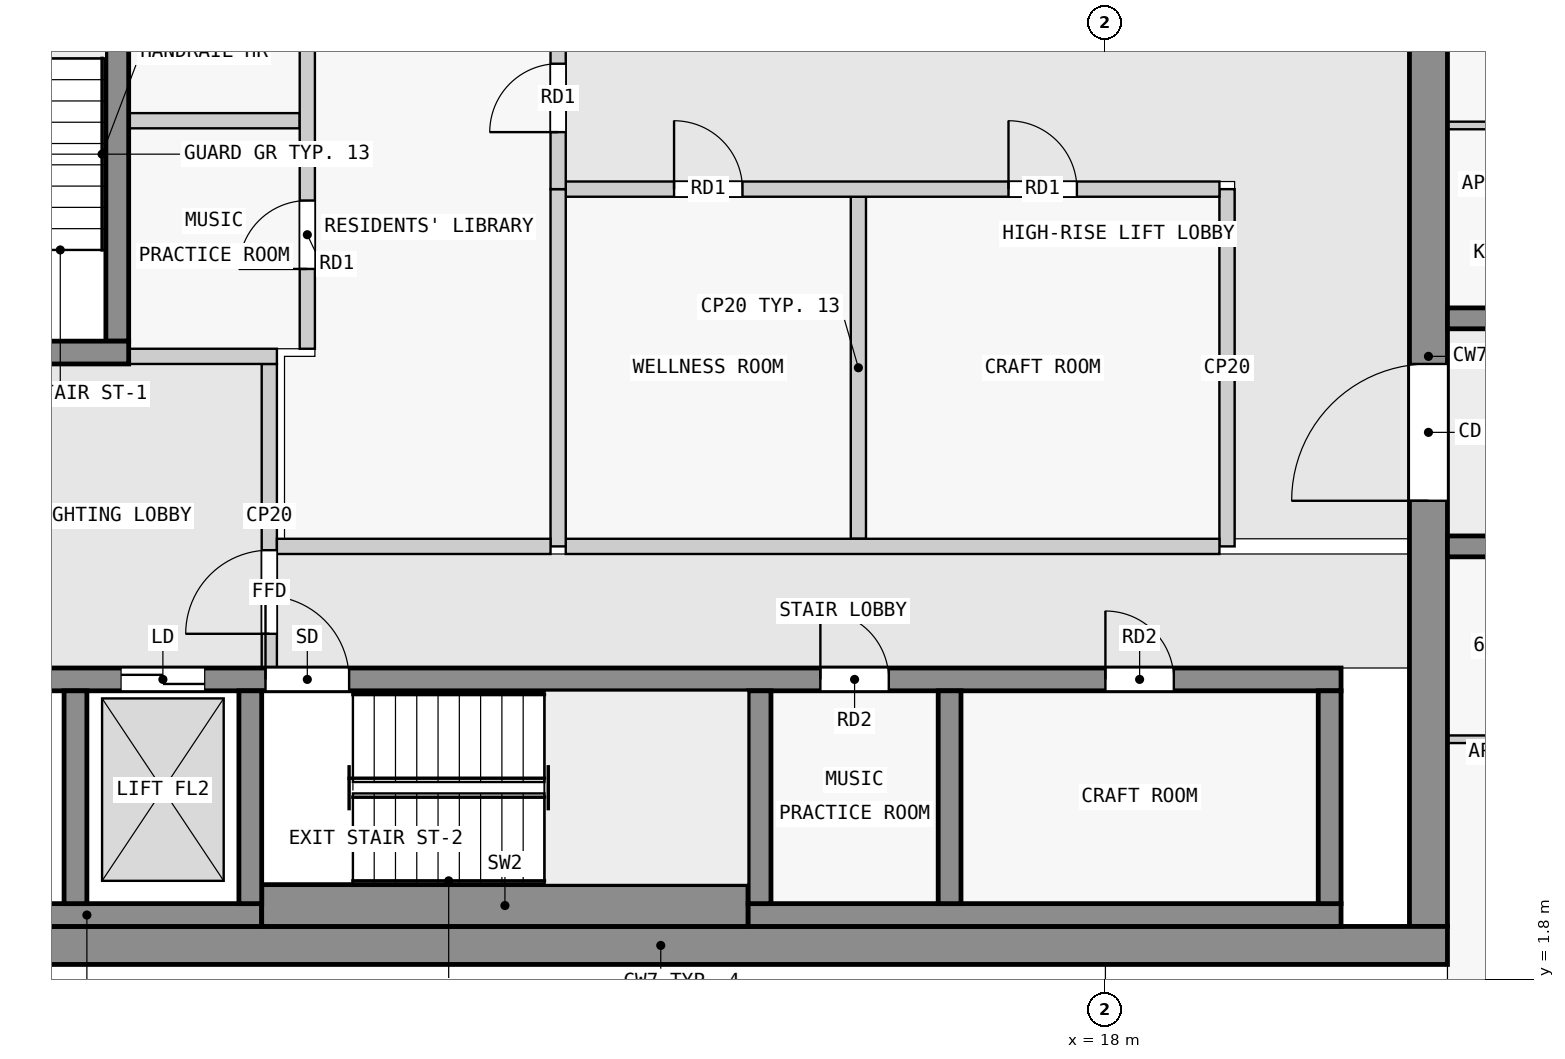
"""IFC4 building model, lengths in metres.
Left out: names, types, materials, properties, quantities, classifications, styles, units other than length and angle.
Written with IfcOpenShell. Run it as: python <this file> out.ifc"""

import sys

from ifc_helpers import new_model, si_unit, direction, frame, frame_2d, origin, place, context, subcontext, project, spatial, rectangle, extrude, element, fill, save


model = new_model("IFC4")
c1 = context("Model", 3, precision=1e-05, world=origin(), true_north=direction((0.0, 1.0)))
c2 = subcontext(c1, "Body", "Model", "MODEL_VIEW")
j1 = project(units=[si_unit("LENGTHUNIT", "METRE"), si_unit("PLANEANGLEUNIT", "RADIAN")], contexts=[c1])
p1 = place(None, origin())
s1 = spatial("IfcSite", under=j1, at=p1, CompositionType="ELEMENT")
p2 = place(p1, origin())
s2 = spatial("IfcBuilding", under=s1, at=p2, CompositionType="ELEMENT")
p3 = place(p2, frame((0.0, 0.0, 229.4)))
s3 = spatial("IfcBuildingStorey", under=s2, at=p3, CompositionType="ELEMENT", Elevation=229.4)
p4 = place(p3, frame((1.8, 2.25, 0.0), z_axis=(0.0, 0.0, 1.0), x_axis=(1.0, 0.0, 0.0)))
e1 = element("IfcWall", 1, at=p4, inside=s3, PredefinedType="SHEAR", context=c2, shape_type="SweptSolid", body=[
    extrude(rectangle(XDim=20.7, YDim=0.5, at=frame_2d((10.35, 0.0))), origin(), (0.0, 0.0, 1.0), 3.25),
])
p5 = place(p3, frame((22.25, 2.5, 0.0), z_axis=(0.0, 0.0, 1.0), x_axis=(0.0, 1.0, 0.0)))
e2 = element("IfcWall", 2, at=p5, inside=s3, PredefinedType="SHEAR", context=c2, shape_type="SweptSolid", body=[
    extrude(rectangle(XDim=15.0, YDim=0.5, at=frame_2d((7.5, 0.0))), origin(), (0.0, 0.0, 1.0), 3.25),
])
p6 = place(p5, frame((5.6, 0.0, 0.0)))
e3 = element("IfcOpeningElement", 3, at=p6, cuts=e2, PredefinedType="OPENING", context=c2, shape_type="SweptSolid", body=[
    extrude(rectangle(XDim=1.8, YDim=2.1, at=frame_2d((0.9, 1.05))), frame((0.0, 0.26, 0.0), z_axis=(0.0, -1.0, 0.0), x_axis=(1.0, 0.0, 0.0)), (0.0, 0.0, 1.0), 0.52),
])
p7 = place(p3, frame((2.3, 2.65, 0.0), z_axis=(0.0, 0.0, 1.0), x_axis=(1.0, 0.0, 0.0)))
e4 = element("IfcWall", 4, at=p7, inside=s3, PredefinedType="SHEAR", context=c2, shape_type="SweptSolid", body=[
    extrude(rectangle(XDim=4.6, YDim=0.3, at=frame_2d((2.3, 0.0))), origin(), (0.0, 0.0, 1.0), 3.25),
])
p8 = place(p3, frame((6.9, 2.775, 0.0), z_axis=(0.0, 0.0, 1.0), x_axis=(1.0, 0.0, 0.0)))
e5 = element("IfcWall", 5, at=p8, inside=s3, PredefinedType="SHEAR", context=c2, shape_type="SweptSolid", body=[
    extrude(rectangle(XDim=6.4, YDim=0.55, at=frame_2d((3.2, 0.0))), origin(), (0.0, 0.0, 1.0), 3.25),
])
p9 = place(p3, frame((13.3, 2.65, 0.0), z_axis=(0.0, 0.0, 1.0), x_axis=(1.0, 0.0, 0.0)))
e6 = element("IfcWall", 6, at=p9, inside=s3, PredefinedType="SHEAR", context=c2, shape_type="SweptSolid", body=[
    extrude(rectangle(XDim=7.8, YDim=0.3, at=frame_2d((3.9, 0.0))), origin(), (0.0, 0.0, 1.0), 3.25),
])
for number, where, z_axis, x_axis in (
    (7, (4.45, 2.8, 0.0), (0.0, 0.0, 1.0), (0.0, 1.0, 0.0)),
    (8, (6.75, 2.8, 0.0), (0.0, 0.0, 1.0), (0.0, 1.0, 0.0)),
    (9, (13.45, 2.8, 0.0), (0.0, 0.0, 1.0), (0.0, 1.0, 0.0)),
    (10, (15.95, 2.8, 0.0), (0.0, 0.0, 1.0), (0.0, 1.0, 0.0)),
    (11, (20.95, 2.8, 0.0), (0.0, 0.0, 1.0), (0.0, 1.0, 0.0)),
):
    element("IfcWall", number, at=place(p3, frame(where, z_axis=z_axis, x_axis=x_axis)), inside=s3, PredefinedType="SHEAR", context=c2, shape_type="SweptSolid", body=[
        extrude(rectangle(XDim=2.8, YDim=0.3, at=frame_2d((1.4, 0.0))), origin(), (0.0, 0.0, 1.0), 3.25),
    ])
p10 = place(p3, frame((2.3, 5.75, 0.0), z_axis=(0.0, 0.0, 1.0), x_axis=(1.0, 0.0, 0.0)))
e12 = element("IfcWall", 12, at=p10, inside=s3, PredefinedType="SHEAR", context=c2, shape_type="SweptSolid", body=[
    extrude(rectangle(XDim=18.8, YDim=0.3, at=frame_2d((9.4, 0.0))), origin(), (0.0, 0.0, 1.0), 3.25),
])
p11 = place(p10, frame((4.65, 0.0, 0.0)))
e13 = element("IfcOpeningElement", 13, at=p11, cuts=e12, PredefinedType="OPENING", context=c2, shape_type="SweptSolid", body=[
    extrude(rectangle(XDim=1.1, YDim=2.1, at=frame_2d((0.55, 1.05))), frame((0.0, 0.16, 0.0), z_axis=(0.0, -1.0, 0.0), x_axis=(1.0, 0.0, 0.0)), (0.0, 0.0, 1.0), 0.32),
])
p12 = place(p10, frame((0.45, 0.0, 0.0)))
e14 = element("IfcOpeningElement", 14, at=p12, cuts=e12, PredefinedType="OPENING", context=c2, shape_type="SweptSolid", body=[
    extrude(rectangle(XDim=1.1, YDim=2.1, at=frame_2d((0.55, 1.05))), frame((0.0, 0.16, 0.0), z_axis=(0.0, -1.0, 0.0), x_axis=(1.0, 0.0, 0.0)), (0.0, 0.0, 1.0), 0.32),
])
p13 = place(p10, frame((2.75, 0.0, 0.0)))
e15 = element("IfcOpeningElement", 15, at=p13, cuts=e12, PredefinedType="OPENING", context=c2, shape_type="SweptSolid", body=[
    extrude(rectangle(XDim=1.1, YDim=2.1, at=frame_2d((0.55, 1.05))), frame((0.0, 0.16, 0.0), z_axis=(0.0, -1.0, 0.0), x_axis=(1.0, 0.0, 0.0)), (0.0, 0.0, 1.0), 0.32),
])
p14 = place(p10, frame((11.95, 0.0, 0.0)))
e16 = element("IfcOpeningElement", 16, at=p14, cuts=e12, PredefinedType="OPENING", context=c2, shape_type="SweptSolid", body=[
    extrude(rectangle(XDim=0.9, YDim=2.1, at=frame_2d((0.45, 1.05))), frame((0.0, 0.16, 0.0), z_axis=(0.0, -1.0, 0.0), x_axis=(1.0, 0.0, 0.0)), (0.0, 0.0, 1.0), 0.32),
])
p15 = place(p10, frame((15.7, 0.0, 0.0)))
e17 = element("IfcOpeningElement", 17, at=p15, cuts=e12, PredefinedType="OPENING", context=c2, shape_type="SweptSolid", body=[
    extrude(rectangle(XDim=0.9, YDim=2.1, at=frame_2d((0.45, 1.05))), frame((0.0, 0.16, 0.0), z_axis=(0.0, -1.0, 0.0), x_axis=(1.0, 0.0, 0.0)), (0.0, 0.0, 1.0), 0.32),
])
p16 = place(p3, frame((2.3, 10.05, 0.0), z_axis=(0.0, 0.0, 1.0), x_axis=(1.0, 0.0, 0.0)))
e18 = element("IfcWall", 18, at=p16, inside=s3, PredefinedType="SHEAR", context=c2, shape_type="SweptSolid", body=[
    extrude(rectangle(XDim=2.85, YDim=0.3, at=frame_2d((1.425, 0.0))), origin(), (0.0, 0.0, 1.0), 3.25),
])
p17 = place(p16, frame((0.25, 0.0, 0.0)))
e19 = element("IfcOpeningElement", 19, at=p17, cuts=e18, PredefinedType="OPENING", context=c2, shape_type="SweptSolid", body=[
    extrude(rectangle(XDim=1.1, YDim=2.1, at=frame_2d((0.55, 1.05))), frame((0.0, 0.16, 0.0), z_axis=(0.0, -1.0, 0.0), x_axis=(1.0, 0.0, 0.0)), (0.0, 0.0, 1.0), 0.32),
])
p18 = place(p3, frame((5.0, 10.2, 0.0), z_axis=(0.0, 0.0, 1.0), x_axis=(0.0, 1.0, 0.0)))
e20 = element("IfcWall", 20, at=p18, inside=s3, PredefinedType="SHEAR", context=c2, shape_type="SweptSolid", body=[
    extrude(rectangle(XDim=6.4, YDim=0.3, at=frame_2d((3.2, 0.0))), origin(), (0.0, 0.0, 1.0), 3.25),
])
p19 = place(p3, frame((22.5, 7.5, 0.0), z_axis=(0.0, 0.0, 1.0), x_axis=(1.0, 0.0, 0.0)))
e21 = element("IfcWall", 21, at=p19, inside=s3, PredefinedType="SHEAR", context=c2, shape_type="SweptSolid", body=[
    extrude(rectangle(XDim=22.5, YDim=0.275, at=frame_2d((11.25, 0.0))), origin(), (0.0, 0.0, 1.0), 3.25),
])
p20 = place(p19, frame((1.75, 0.0, 0.0)))
e22 = element("IfcOpeningElement", 22, at=p20, cuts=e21, PredefinedType="OPENING", context=c2, shape_type="SweptSolid", body=[
    extrude(rectangle(XDim=1.0, YDim=2.1, at=frame_2d((0.5, 1.05))), frame((0.0, 0.147, 0.0), z_axis=(0.0, -1.0, 0.0), x_axis=(1.0, 0.0, 0.0)), (0.0, 0.0, 1.0), 0.295),
])
p21 = place(p19, frame((5.85, 0.0, 0.0)))
e23 = element("IfcOpeningElement", 23, at=p21, cuts=e21, PredefinedType="OPENING", context=c2, shape_type="SweptSolid", body=[
    extrude(rectangle(XDim=1.8, YDim=2.1, at=frame_2d((0.9, 1.05))), frame((0.0, 0.147, 0.0), z_axis=(0.0, -1.0, 0.0), x_axis=(1.0, 0.0, 0.0)), (0.0, 0.0, 1.0), 0.295),
])
p22 = place(p19, frame((10.75, 0.0, 0.0)))
e24 = element("IfcOpeningElement", 24, at=p22, cuts=e21, PredefinedType="OPENING", context=c2, shape_type="SweptSolid", body=[
    extrude(rectangle(XDim=1.0, YDim=2.1, at=frame_2d((0.5, 1.05))), frame((0.0, 0.147, 0.0), z_axis=(0.0, -1.0, 0.0), x_axis=(1.0, 0.0, 0.0)), (0.0, 0.0, 1.0), 0.295),
])
p23 = place(p19, frame((16.85, 0.0, 0.0)))
e25 = element("IfcOpeningElement", 25, at=p23, cuts=e21, PredefinedType="OPENING", context=c2, shape_type="SweptSolid", body=[
    extrude(rectangle(XDim=1.0, YDim=2.1, at=frame_2d((0.5, 1.05))), frame((0.0, 0.147, 0.0), z_axis=(0.0, -1.0, 0.0), x_axis=(1.0, 0.0, 0.0)), (0.0, 0.0, 1.0), 0.295),
])
p24 = place(p3, frame((22.5, 10.5, 0.0), z_axis=(0.0, 0.0, 1.0), x_axis=(1.0, 0.0, 0.0)))
e26 = element("IfcWall", 26, at=p24, inside=s3, PredefinedType="SHEAR", context=c2, shape_type="SweptSolid", body=[
    extrude(rectangle(XDim=22.5, YDim=0.275, at=frame_2d((11.25, 0.0))), origin(), (0.0, 0.0, 1.0), 3.25),
])
p25 = place(p24, frame((4.05, 0.0, 0.0)))
e27 = element("IfcOpeningElement", 27, at=p25, cuts=e26, PredefinedType="OPENING", context=c2, shape_type="SweptSolid", body=[
    extrude(rectangle(XDim=1.0, YDim=2.1, at=frame_2d((0.5, 1.05))), frame((0.0, 0.147, 0.0), z_axis=(0.0, -1.0, 0.0), x_axis=(1.0, 0.0, 0.0)), (0.0, 0.0, 1.0), 0.295),
])
p26 = place(p24, frame((10.75, 0.0, 0.0)))
e28 = element("IfcOpeningElement", 28, at=p26, cuts=e26, PredefinedType="OPENING", context=c2, shape_type="SweptSolid", body=[
    extrude(rectangle(XDim=1.0, YDim=2.1, at=frame_2d((0.5, 1.05))), frame((0.0, 0.147, 0.0), z_axis=(0.0, -1.0, 0.0), x_axis=(1.0, 0.0, 0.0)), (0.0, 0.0, 1.0), 0.295),
])
p27 = place(p24, frame((15.25, 0.0, 0.0)))
e29 = element("IfcOpeningElement", 29, at=p27, cuts=e26, PredefinedType="OPENING", context=c2, shape_type="SweptSolid", body=[
    extrude(rectangle(XDim=1.0, YDim=2.1, at=frame_2d((0.5, 1.05))), frame((0.0, 0.147, 0.0), z_axis=(0.0, -1.0, 0.0), x_axis=(1.0, 0.0, 0.0)), (0.0, 0.0, 1.0), 0.295),
])
p28 = place(p24, frame((18.75, 0.0, 0.0)))
e30 = element("IfcOpeningElement", 30, at=p28, cuts=e26, PredefinedType="OPENING", context=c2, shape_type="SweptSolid", body=[
    extrude(rectangle(XDim=0.9, YDim=2.1, at=frame_2d((0.45, 1.05))), frame((0.0, 0.147, 0.0), z_axis=(0.0, -1.0, 0.0), x_axis=(1.0, 0.0, 0.0)), (0.0, 0.0, 1.0), 0.295),
])
p29 = place(p24, frame((20.95, 0.0, 0.0)))
e31 = element("IfcOpeningElement", 31, at=p29, cuts=e26, PredefinedType="OPENING", context=c2, shape_type="SweptSolid", body=[
    extrude(rectangle(XDim=1.0, YDim=2.1, at=frame_2d((0.5, 1.05))), frame((0.0, 0.147, 0.0), z_axis=(0.0, -1.0, 0.0), x_axis=(1.0, 0.0, 0.0)), (0.0, 0.0, 1.0), 0.295),
])
p30 = place(p3, frame((7.0, 5.9, 0.0), z_axis=(0.0, 0.0, 1.0), x_axis=(0.0, 1.0, 0.0)))
e32 = element("IfcWall", 32, at=p30, inside=s3, PredefinedType="PARTITIONING", context=c2, shape_type="SweptSolid", body=[
    extrude(rectangle(XDim=4.0, YDim=0.2, at=frame_2d((2.0, 0.0))), origin(), (0.0, 0.0, 1.0), 3.25),
])
p31 = place(p30, frame((0.45, 0.0, 0.0)))
e33 = element("IfcOpeningElement", 33, at=p31, cuts=e32, PredefinedType="OPENING", context=c2, shape_type="SweptSolid", body=[
    extrude(rectangle(XDim=1.1, YDim=2.1, at=frame_2d((0.55, 1.05))), frame((0.0, 0.11, 0.0), z_axis=(0.0, -1.0, 0.0), x_axis=(1.0, 0.0, 0.0)), (0.0, 0.0, 1.0), 0.22),
])
p32 = place(p3, frame((5.15, 10.0, 0.0), z_axis=(0.0, 0.0, 1.0), x_axis=(1.0, 0.0, 0.0)))
e34 = element("IfcWall", 34, at=p32, inside=s3, PredefinedType="PARTITIONING", context=c2, shape_type="SweptSolid", body=[
    extrude(rectangle(XDim=1.95, YDim=0.2, at=frame_2d((0.975, 0.0))), origin(), (0.0, 0.0, 1.0), 3.25),
])
p33 = place(p3, frame((7.1, 7.5, 0.0), z_axis=(0.0, 0.0, 1.0), x_axis=(1.0, 0.0, 0.0)))
e35 = element("IfcWall", 35, at=p33, inside=s3, PredefinedType="PARTITIONING", context=c2, shape_type="SweptSolid", body=[
    extrude(rectangle(XDim=3.6, YDim=0.2, at=frame_2d((1.8, 0.0))), origin(), (0.0, 0.0, 1.0), 3.25),
])
p34 = place(p3, frame((10.8, 12.2, 0.0), z_axis=(0.0, 0.0, 1.0), x_axis=(0.0, 1.0, 0.0)))
e36 = element("IfcWall", 36, at=p34, inside=s3, PredefinedType="PARTITIONING", context=c2, shape_type="SweptSolid", body=[
    extrude(rectangle(XDim=2.4, YDim=0.2, at=frame_2d((1.2, 0.0))), origin(), (0.0, 0.0, 1.0), 3.25),
])
p35 = place(p34, frame((0.75, 0.0, 0.0)))
e37 = element("IfcOpeningElement", 37, at=p35, cuts=e36, PredefinedType="OPENING", context=c2, shape_type="SweptSolid", body=[
    extrude(rectangle(XDim=0.9, YDim=2.1, at=frame_2d((0.45, 1.05))), frame((0.0, 0.11, 0.0), z_axis=(0.0, -1.0, 0.0), x_axis=(1.0, 0.0, 0.0)), (0.0, 0.0, 1.0), 0.22),
])
p36 = place(p3, frame((10.8, 7.5, 0.0), z_axis=(0.0, 0.0, 1.0), x_axis=(0.0, 1.0, 0.0)))
e38 = element("IfcWall", 38, at=p36, inside=s3, PredefinedType="PARTITIONING", context=c2, shape_type="SweptSolid", body=[
    extrude(rectangle(XDim=4.7, YDim=0.2, at=frame_2d((2.35, 0.0))), origin(), (0.0, 0.0, 1.0), 3.25),
])
p37 = place(p3, frame((10.9, 7.5, 0.0), z_axis=(0.0, 0.0, 1.0), x_axis=(1.0, 0.0, 0.0)))
e39 = element("IfcWall", 39, at=p37, inside=s3, PredefinedType="PARTITIONING", context=c2, shape_type="SweptSolid", body=[
    extrude(rectangle(XDim=8.6, YDim=0.2, at=frame_2d((4.3, 0.0))), origin(), (0.0, 0.0, 1.0), 3.25),
])
p38 = place(p3, frame((19.6, 7.5, 0.0), z_axis=(0.0, 0.0, 1.0), x_axis=(0.0, 1.0, 0.0)))
e40 = element("IfcWall", 40, at=p38, inside=s3, PredefinedType="PARTITIONING", context=c2, shape_type="SweptSolid", body=[
    extrude(rectangle(XDim=4.7, YDim=0.2, at=frame_2d((2.35, 0.0))), origin(), (0.0, 0.0, 1.0), 3.25),
])
p39 = place(p3, frame((10.9, 12.2, 0.0), z_axis=(0.0, 0.0, 1.0), x_axis=(1.0, 0.0, 0.0)))
e41 = element("IfcWall", 41, at=p39, inside=s3, PredefinedType="PARTITIONING", context=c2, shape_type="SweptSolid", body=[
    extrude(rectangle(XDim=8.6, YDim=0.2, at=frame_2d((4.3, 0.0))), origin(), (0.0, 0.0, 1.0), 3.25),
])
p40 = place(p39, frame((1.425, 0.0, 0.0)))
e42 = element("IfcOpeningElement", 42, at=p40, cuts=e41, PredefinedType="OPENING", context=c2, shape_type="SweptSolid", body=[
    extrude(rectangle(XDim=0.9, YDim=2.1, at=frame_2d((0.45, 1.05))), frame((0.0, 0.11, 0.0), z_axis=(0.0, -1.0, 0.0), x_axis=(1.0, 0.0, 0.0)), (0.0, 0.0, 1.0), 0.22),
])
p41 = place(p39, frame((5.825, 0.0, 0.0)))
e43 = element("IfcOpeningElement", 43, at=p41, cuts=e41, PredefinedType="OPENING", context=c2, shape_type="SweptSolid", body=[
    extrude(rectangle(XDim=0.9, YDim=2.1, at=frame_2d((0.45, 1.05))), frame((0.0, 0.11, 0.0), z_axis=(0.0, -1.0, 0.0), x_axis=(1.0, 0.0, 0.0)), (0.0, 0.0, 1.0), 0.22),
])
p42 = place(p3, frame((14.75, 7.6, 0.0), z_axis=(0.0, 0.0, 1.0), x_axis=(0.0, 1.0, 0.0)))
e44 = element("IfcWall", 44, at=p42, inside=s3, PredefinedType="PARTITIONING", context=c2, shape_type="SweptSolid", body=[
    extrude(rectangle(XDim=4.5, YDim=0.2, at=frame_2d((2.25, 0.0))), origin(), (0.0, 0.0, 1.0), 3.25),
])
p43 = place(p3, frame((7.5, 10.1, 0.0), z_axis=(0.0, 0.0, 1.0), x_axis=(0.0, 1.0, 0.0)))
e45 = element("IfcWall", 45, at=p43, inside=s3, PredefinedType="PARTITIONING", context=c2, shape_type="SweptSolid", body=[
    extrude(rectangle(XDim=7.4, YDim=0.2, at=frame_2d((3.7, 0.0))), origin(), (0.0, 0.0, 1.0), 3.25),
])
p44 = place(p43, frame((1.05, 0.0, 0.0)))
e46 = element("IfcOpeningElement", 46, at=p44, cuts=e45, PredefinedType="OPENING", context=c2, shape_type="SweptSolid", body=[
    extrude(rectangle(XDim=0.9, YDim=2.1, at=frame_2d((0.45, 1.05))), frame((0.0, 0.11, 0.0), z_axis=(0.0, -1.0, 0.0), x_axis=(1.0, 0.0, 0.0)), (0.0, 0.0, 1.0), 0.22),
])
p45 = place(p43, frame((4.75, 0.0, 0.0)))
e47 = element("IfcOpeningElement", 47, at=p45, cuts=e45, PredefinedType="OPENING", context=c2, shape_type="SweptSolid", body=[
    extrude(rectangle(XDim=0.9, YDim=2.1, at=frame_2d((0.45, 1.05))), frame((0.0, 0.11, 0.0), z_axis=(0.0, -1.0, 0.0), x_axis=(1.0, 0.0, 0.0)), (0.0, 0.0, 1.0), 0.22),
])
p46 = place(p3, frame((5.15, 13.1, 0.0), z_axis=(0.0, 0.0, 1.0), x_axis=(1.0, 0.0, 0.0)))
e48 = element("IfcWall", 48, at=p46, inside=s3, PredefinedType="PARTITIONING", context=c2, shape_type="SweptSolid", body=[
    extrude(rectangle(XDim=2.25, YDim=0.2, at=frame_2d((1.125, 0.0))), origin(), (0.0, 0.0, 1.0), 3.25),
])
p47 = place(p3, frame((22.5, 4.962, 0.0), z_axis=(0.0, 0.0, 1.0), x_axis=(1.0, 0.0, 0.0)))
e49 = element("IfcWall", 49, at=p47, inside=s3, PredefinedType="PARTITIONING", context=c2, shape_type="SweptSolid", body=[
    extrude(rectangle(XDim=1.45, YDim=0.1, at=frame_2d((0.725, 0.0))), origin(), (0.0, 0.0, 1.0), 3.25),
])
p48 = place(p3, frame((24.25, 13.038, 0.0), z_axis=(0.0, 0.0, 1.0), x_axis=(-1.0, 0.0, 0.0)))
e50 = element("IfcWall", 50, at=p48, inside=s3, PredefinedType="PARTITIONING", context=c2, shape_type="SweptSolid", body=[
    extrude(rectangle(XDim=1.75, YDim=0.1, at=frame_2d((0.875, 0.0))), origin(), (0.0, 0.0, 1.0), 3.25),
])
p49 = place(p31, origin())
e51 = element("IfcDoor", 51, at=p49, inside=s3, OperationType="SINGLE_SWING_LEFT", PredefinedType="DOOR", context=c2, shape_type="SweptSolid", body=[
    extrude(rectangle(XDim=1.1, YDim=2.1, at=frame_2d((0.55, 1.05))), frame((0.0, 0.025, 0.0), z_axis=(0.0, -1.0, 0.0), x_axis=(1.0, 0.0, 0.0)), (0.0, 0.0, 1.0), 0.05),
])
fill(e33, e51)
p50 = place(p35, origin())
e52 = element("IfcDoor", 52, at=p50, inside=s3, OperationType="SINGLE_SWING_LEFT", PredefinedType="DOOR", context=c2, shape_type="SweptSolid", body=[
    extrude(rectangle(XDim=0.9, YDim=2.1, at=frame_2d((0.45, 1.05))), frame((0.0, 0.025, 0.0), z_axis=(0.0, -1.0, 0.0), x_axis=(1.0, 0.0, 0.0)), (0.0, 0.0, 1.0), 0.05),
])
fill(e37, e52)
p51 = place(p40, origin())
e53 = element("IfcDoor", 53, at=p51, inside=s3, OperationType="SINGLE_SWING_LEFT", PredefinedType="DOOR", context=c2, shape_type="SweptSolid", body=[
    extrude(rectangle(XDim=0.9, YDim=2.1, at=frame_2d((0.45, 1.05))), frame((0.0, 0.025, 0.0), z_axis=(0.0, -1.0, 0.0), x_axis=(1.0, 0.0, 0.0)), (0.0, 0.0, 1.0), 0.05),
])
fill(e42, e53)
p52 = place(p41, origin())
e54 = element("IfcDoor", 54, at=p52, inside=s3, OperationType="SINGLE_SWING_LEFT", PredefinedType="DOOR", context=c2, shape_type="SweptSolid", body=[
    extrude(rectangle(XDim=0.9, YDim=2.1, at=frame_2d((0.45, 1.05))), frame((0.0, 0.025, 0.0), z_axis=(0.0, -1.0, 0.0), x_axis=(1.0, 0.0, 0.0)), (0.0, 0.0, 1.0), 0.05),
])
fill(e43, e54)
p53 = place(p11, origin())
e55 = element("IfcDoor", 55, at=p53, inside=s3, OperationType="SINGLE_SWING_LEFT", PredefinedType="DOOR", context=c2, shape_type="SweptSolid", body=[
    extrude(rectangle(XDim=1.1, YDim=2.1, at=frame_2d((0.55, 1.05))), frame((0.0, 0.025, 0.0), z_axis=(0.0, -1.0, 0.0), x_axis=(1.0, 0.0, 0.0)), (0.0, 0.0, 1.0), 0.05),
])
fill(e13, e55)
p54 = place(p13, origin())
e56 = element("IfcDoor", 56, at=p54, inside=s3, OperationType="DOUBLE_DOOR_SLIDING", PredefinedType="DOOR", context=c2, shape_type="SweptSolid", body=[
    extrude(rectangle(XDim=1.1, YDim=2.1, at=frame_2d((0.55, 1.05))), frame((0.0, 0.025, 0.0), z_axis=(0.0, -1.0, 0.0), x_axis=(1.0, 0.0, 0.0)), (0.0, 0.0, 1.0), 0.05),
])
fill(e15, e56)
p55 = place(p6, origin())
e57 = element("IfcDoor", 57, at=p55, inside=s3, OperationType="DOUBLE_DOOR_SINGLE_SWING", PredefinedType="DOOR", context=c2, shape_type="SweptSolid", body=[
    extrude(rectangle(XDim=1.8, YDim=2.1, at=frame_2d((0.9, 1.05))), frame((0.0, 0.025, 0.0), z_axis=(0.0, -1.0, 0.0), x_axis=(1.0, 0.0, 0.0)), (0.0, 0.0, 1.0), 0.05),
])
fill(e3, e57)
p56 = place(p44, origin())
e58 = element("IfcDoor", 58, at=p56, inside=s3, OperationType="SINGLE_SWING_RIGHT", PredefinedType="DOOR", context=c2, shape_type="SweptSolid", body=[
    extrude(rectangle(XDim=0.9, YDim=2.1, at=frame_2d((0.45, 1.05))), frame((0.0, 0.025, 0.0), z_axis=(0.0, -1.0, 0.0), x_axis=(1.0, 0.0, 0.0)), (0.0, 0.0, 1.0), 0.05),
])
fill(e46, e58)
p57 = place(p14, origin())
e59 = element("IfcDoor", 59, at=p57, inside=s3, OperationType="SINGLE_SWING_LEFT", PredefinedType="DOOR", context=c2, shape_type="SweptSolid", body=[
    extrude(rectangle(XDim=0.9, YDim=2.1, at=frame_2d((0.45, 1.05))), frame((0.0, 0.025, 0.0), z_axis=(0.0, -1.0, 0.0), x_axis=(1.0, 0.0, 0.0)), (0.0, 0.0, 1.0), 0.05),
])
fill(e16, e59)
p58 = place(p15, origin())
e60 = element("IfcDoor", 60, at=p58, inside=s3, OperationType="SINGLE_SWING_LEFT", PredefinedType="DOOR", context=c2, shape_type="SweptSolid", body=[
    extrude(rectangle(XDim=0.9, YDim=2.1, at=frame_2d((0.45, 1.05))), frame((0.0, 0.025, 0.0), z_axis=(0.0, -1.0, 0.0), x_axis=(1.0, 0.0, 0.0)), (0.0, 0.0, 1.0), 0.05),
])
fill(e17, e60)
save(model, sys.argv[1])
